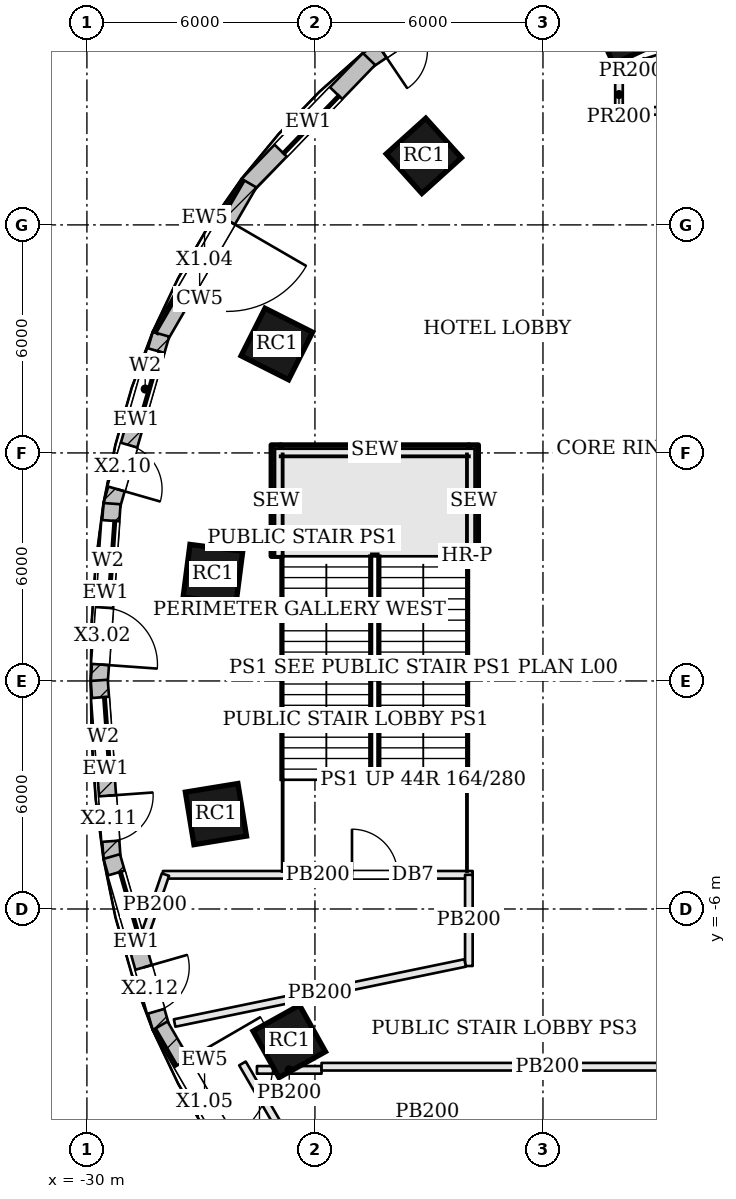
"""IFC4 building model, lengths in metres.
Left out: names, types, materials, properties, quantities, classifications, styles, units other than length and angle.
Written with IfcOpenShell. Run it as: python <this file> out.ifc"""

import sys

from ifc_helpers import new_model, si_unit, direction, frame, frame_2d, origin, origin_2d, place, context, subcontext, project, spatial, rectangle, extrude, element, fill, save


model = new_model("IFC4")
c1 = context("Model", 3, precision=1e-05, world=origin(), true_north=direction((0.0, 1.0)))
c2 = subcontext(c1, "Body", "Model", "MODEL_VIEW")
j1 = project(units=[si_unit("LENGTHUNIT", "METRE"), si_unit("PLANEANGLEUNIT", "RADIAN")], contexts=[c1])
p1 = place(None, origin())
s1 = spatial("IfcSite", under=j1, at=p1, CompositionType="ELEMENT")
p2 = place(p1, origin())
s2 = spatial("IfcBuilding", under=s1, at=p2, CompositionType="ELEMENT")
p3 = place(p2, origin())
s3 = spatial("IfcBuildingStorey", under=s2, at=p3, CompositionType="ELEMENT", Elevation=0.0)
for number, where, z_axis, x_axis in (
    (1, (-15.799, 17.165, 0.0), (0.0, 0.0, 1.0), (-0.908, -0.419, 0.0)),
    (2, (-21.135, 13.817, 0.0), (0.0, 0.0, 1.0), (-0.743, -0.67, 0.0)),
    (3, (-25.003, 8.866, 0.0), (0.0, 0.0, 1.0), (-0.45, -0.893, 0.0)),
    (4, (-26.684, 2.808, 0.0), (0.0, 0.0, 1.0), (-0.128, -0.992, 0.0)),
    (5, (-26.605, -3.503, 0.0), (0.0, 0.0, 1.0), (0.161, -0.987, 0.0)),
    (6, (-24.676, -9.483, 0.0), (0.0, 0.0, 1.0), (0.487, -0.873, 0.0)),
):
    element("IfcColumn", number, at=place(p3, frame(where, z_axis=z_axis, x_axis=x_axis)), inside=s3, PredefinedType="COLUMN", context=c2, shape_type="SweptSolid", body=[
        extrude(rectangle(XDim=1.4, YDim=1.4, at=origin_2d()), origin(), (0.0, 0.0, 1.0), 7.2),
    ])
p4 = place(p3, frame((-18.9, 18.84, 0.0), z_axis=(0.0, 0.0, 1.0), x_axis=(-0.828976924359, -0.559282807604, 0.0)))
e7 = element("IfcWall", 7, at=p4, inside=s3, PredefinedType="SOLIDWALL", context=c2, shape_type="SweptSolid", body=[
    extrude(rectangle(XDim=4.479, YDim=0.45, at=frame_2d((2.24, 0.0))), origin(), (0.0, 0.0, 1.0), 6.95),
])
p5 = place(p4, frame((0.45, 0.0, 0.9)))
e8 = element("IfcOpeningElement", 8, at=p5, cuts=e7, PredefinedType="OPENING", context=c2, shape_type="SweptSolid", body=[
    extrude(rectangle(XDim=2.1, YDim=5.0, at=frame_2d((1.05, 2.5))), frame((0.0, 0.235, 0.0), z_axis=(0.0, -1.0, 0.0), x_axis=(1.0, 0.0, 0.0)), (0.0, 0.0, 1.0), 0.47),
])
p6 = place(p4, frame((2.829, 0.0, 0.0)))
e9 = element("IfcOpeningElement", 9, at=p6, cuts=e7, PredefinedType="OPENING", context=c2, shape_type="SweptSolid", body=[
    extrude(rectangle(XDim=1.2, YDim=2.4, at=frame_2d((0.6, 1.2))), frame((0.0, 0.235, 0.0), z_axis=(0.0, -1.0, 0.0), x_axis=(1.0, 0.0, 0.0)), (0.0, 0.0, 1.0), 0.47),
])
p7 = place(p3, frame((-22.577, 16.365, 0.0), z_axis=(0.0, 0.0, 1.0), x_axis=(-0.694191591241, -0.719790271294, 0.0)))
e10 = element("IfcWall", 10, at=p7, inside=s3, PredefinedType="SOLIDWALL", context=c2, shape_type="SweptSolid", body=[
    extrude(rectangle(XDim=4.597, YDim=0.45, at=frame_2d((2.298, 0.0))), origin(), (0.0, 0.0, 1.0), 6.95),
])
p8 = place(p7, frame((1.249, 0.0, 0.9)))
e11 = element("IfcOpeningElement", 11, at=p8, cuts=e10, PredefinedType="OPENING", context=c2, shape_type="SweptSolid", body=[
    extrude(rectangle(XDim=2.1, YDim=5.0, at=frame_2d((1.05, 2.5))), frame((0.0, 0.235, 0.0), z_axis=(0.0, -1.0, 0.0), x_axis=(1.0, 0.0, 0.0)), (0.0, 0.0, 1.0), 0.47),
])
p9 = place(p3, frame((-25.735, 13.099, 0.0), z_axis=(0.0, 0.0, 1.0), x_axis=(-0.502106426501, -0.864805837438, 0.0)))
e12 = element("IfcWall", 12, at=p9, inside=s3, PredefinedType="SOLIDWALL", context=c2, shape_type="SweptSolid", body=[
    extrude(rectangle(XDim=4.657, YDim=0.45, at=frame_2d((2.328, 0.0))), origin(), (0.0, 0.0, 1.0), 3.55),
])
p10 = place(p9, frame((1.128, 0.0, 0.0)))
e13 = element("IfcOpeningElement", 13, at=p10, cuts=e12, PredefinedType="OPENING", context=c2, shape_type="SweptSolid", body=[
    extrude(rectangle(XDim=2.4, YDim=3.2, at=frame_2d((1.2, 1.6))), frame((0.0, 0.235, 0.0), z_axis=(0.0, -1.0, 0.0), x_axis=(1.0, 0.0, 0.0)), (0.0, 0.0, 1.0), 0.47),
])
p11 = place(p3, frame((-28.052, 9.123, 0.0), z_axis=(0.0, 0.0, 1.0), x_axis=(-0.27637239746, -0.961050621935, 0.0)))
e14 = element("IfcWall", 14, at=p11, inside=s3, PredefinedType="SOLIDWALL", context=c2, shape_type="SweptSolid", body=[
    extrude(rectangle(XDim=4.685, YDim=0.45, at=frame_2d((2.343, 0.0))), origin(), (0.0, 0.0, 1.0), 6.95),
])
p12 = place(p11, frame((0.45, 0.0, 0.9)))
e15 = element("IfcOpeningElement", 15, at=p12, cuts=e14, PredefinedType="OPENING", context=c2, shape_type="SweptSolid", body=[
    extrude(rectangle(XDim=2.1, YDim=5.0, at=frame_2d((1.05, 2.5))), frame((0.0, 0.235, 0.0), z_axis=(0.0, -1.0, 0.0), x_axis=(1.0, 0.0, 0.0)), (0.0, 0.0, 1.0), 0.47),
])
p13 = place(p11, frame((3.035, 0.0, 0.0)))
e16 = element("IfcOpeningElement", 16, at=p13, cuts=e14, PredefinedType="OPENING", context=c2, shape_type="SweptSolid", body=[
    extrude(rectangle(XDim=1.2, YDim=2.4, at=frame_2d((0.6, 1.2))), frame((0.0, 0.235, 0.0), z_axis=(0.0, -1.0, 0.0), x_axis=(1.0, 0.0, 0.0)), (0.0, 0.0, 1.0), 0.47),
])
p14 = place(p3, frame((-29.339, 4.666, 0.0), z_axis=(0.0, 0.0, 1.0), x_axis=(-0.071775601577, -0.997420805387, 0.0)))
e17 = element("IfcWall", 17, at=p14, inside=s3, PredefinedType="SOLIDWALL", context=c2, shape_type="SweptSolid", body=[
    extrude(rectangle(XDim=4.694, YDim=0.45, at=frame_2d((2.347, 0.0))), origin(), (0.0, 0.0, 1.0), 6.95),
])
p15 = place(p14, frame((0.45, 0.0, 0.9)))
e18 = element("IfcOpeningElement", 18, at=p15, cuts=e17, PredefinedType="OPENING", context=c2, shape_type="SweptSolid", body=[
    extrude(rectangle(XDim=2.1, YDim=5.0, at=frame_2d((1.05, 2.5))), frame((0.0, 0.235, 0.0), z_axis=(0.0, -1.0, 0.0), x_axis=(1.0, 0.0, 0.0)), (0.0, 0.0, 1.0), 0.47),
])
p16 = place(p14, frame((2.744, 0.0, 0.0)))
e19 = element("IfcOpeningElement", 19, at=p16, cuts=e17, PredefinedType="OPENING", context=c2, shape_type="SweptSolid", body=[
    extrude(rectangle(XDim=1.5, YDim=2.4, at=frame_2d((0.75, 1.2))), frame((0.0, 0.235, 0.0), z_axis=(0.0, -1.0, 0.0), x_axis=(1.0, 0.0, 0.0)), (0.0, 0.0, 1.0), 0.47),
])
p17 = place(p3, frame((-29.676, 0.016, 0.0), z_axis=(0.0, 0.0, 1.0), x_axis=(0.071775601577, -0.997420805387, 0.0)))
e20 = element("IfcWall", 20, at=p17, inside=s3, PredefinedType="SOLIDWALL", context=c2, shape_type="SweptSolid", body=[
    extrude(rectangle(XDim=4.694, YDim=0.45, at=frame_2d((2.347, 0.0))), origin(), (0.0, 0.0, 1.0), 6.95),
])
p18 = place(p17, frame((0.45, 0.0, 0.9)))
e21 = element("IfcOpeningElement", 21, at=p18, cuts=e20, PredefinedType="OPENING", context=c2, shape_type="SweptSolid", body=[
    extrude(rectangle(XDim=2.1, YDim=5.0, at=frame_2d((1.05, 2.5))), frame((0.0, 0.235, 0.0), z_axis=(0.0, -1.0, 0.0), x_axis=(1.0, 0.0, 0.0)), (0.0, 0.0, 1.0), 0.47),
])
p19 = place(p17, frame((3.044, 0.0, 0.0)))
e22 = element("IfcOpeningElement", 22, at=p19, cuts=e20, PredefinedType="OPENING", context=c2, shape_type="SweptSolid", body=[
    extrude(rectangle(XDim=1.2, YDim=2.4, at=frame_2d((0.6, 1.2))), frame((0.0, 0.235, 0.0), z_axis=(0.0, -1.0, 0.0), x_axis=(1.0, 0.0, 0.0)), (0.0, 0.0, 1.0), 0.47),
])
p20 = place(p3, frame((-29.347, -4.62, 0.0), z_axis=(0.0, 0.0, 1.0), x_axis=(0.27637239746, -0.961050621935, 0.0)))
e23 = element("IfcWall", 23, at=p20, inside=s3, PredefinedType="SOLIDWALL", context=c2, shape_type="SweptSolid", body=[
    extrude(rectangle(XDim=4.685, YDim=0.45, at=frame_2d((2.343, 0.0))), origin(), (0.0, 0.0, 1.0), 6.95),
])
p21 = place(p20, frame((0.45, 0.0, 0.9)))
e24 = element("IfcOpeningElement", 24, at=p21, cuts=e23, PredefinedType="OPENING", context=c2, shape_type="SweptSolid", body=[
    extrude(rectangle(XDim=2.1, YDim=5.0, at=frame_2d((1.05, 2.5))), frame((0.0, 0.235, 0.0), z_axis=(0.0, -1.0, 0.0), x_axis=(1.0, 0.0, 0.0)), (0.0, 0.0, 1.0), 0.47),
])
p22 = place(p20, frame((3.035, 0.0, 0.0)))
e25 = element("IfcOpeningElement", 25, at=p22, cuts=e23, PredefinedType="OPENING", context=c2, shape_type="SweptSolid", body=[
    extrude(rectangle(XDim=1.2, YDim=2.4, at=frame_2d((0.6, 1.2))), frame((0.0, 0.235, 0.0), z_axis=(0.0, -1.0, 0.0), x_axis=(1.0, 0.0, 0.0)), (0.0, 0.0, 1.0), 0.47),
])
p23 = place(p3, frame((-28.073, -9.072, 0.0), z_axis=(0.0, 0.0, 1.0), x_axis=(0.502106426501, -0.864805837438, 0.0)))
e26 = element("IfcWall", 26, at=p23, inside=s3, PredefinedType="SOLIDWALL", context=c2, shape_type="SweptSolid", body=[
    extrude(rectangle(XDim=4.657, YDim=0.45, at=frame_2d((2.328, 0.0))), origin(), (0.0, 0.0, 1.0), 3.55),
])
p24 = place(p23, frame((1.128, 0.0, 0.0)))
e27 = element("IfcOpeningElement", 27, at=p24, cuts=e26, PredefinedType="OPENING", context=c2, shape_type="SweptSolid", body=[
    extrude(rectangle(XDim=2.4, YDim=3.2, at=frame_2d((1.2, 1.6))), frame((0.0, 0.235, 0.0), z_axis=(0.0, -1.0, 0.0), x_axis=(1.0, 0.0, 0.0)), (0.0, 0.0, 1.0), 0.47),
])
p25 = place(p3, frame((-28.0, -5.1, 0.0), z_axis=(0.0, 0.0, 1.0), x_axis=(1.0, 0.0, 0.0)))
e28 = element("IfcWall", 28, at=p25, inside=s3, PredefinedType="PARTITIONING", context=c2, shape_type="SweptSolid", body=[
    extrude(rectangle(XDim=8.15, YDim=0.2, at=frame_2d((4.075, 0.0))), origin(), (0.0, 0.0, 1.0), 6.23),
])
p26 = place(p25, frame((4.975, 0.0, 0.0)))
e29 = element("IfcOpeningElement", 29, at=p26, cuts=e28, PredefinedType="OPENING", context=c2, shape_type="SweptSolid", body=[
    extrude(rectangle(XDim=1.2, YDim=2.1, at=frame_2d((0.6, 1.05))), frame((0.0, 0.11, 0.0), z_axis=(0.0, -1.0, 0.0), x_axis=(1.0, 0.0, 0.0)), (0.0, 0.0, 1.0), 0.22),
])
p27 = place(p3, frame((-19.95, -5.1, 0.0), z_axis=(0.0, 0.0, 1.0), x_axis=(0.0, -1.0, 0.0)))
e30 = element("IfcWall", 30, at=p27, inside=s3, PredefinedType="PARTITIONING", context=c2, shape_type="SweptSolid", body=[
    extrude(rectangle(XDim=2.4, YDim=0.2, at=frame_2d((1.2, 0.0))), origin(), (0.0, 0.0, 1.0), 6.23),
])
p28 = place(p3, frame((-20.048, -7.42, 0.0), z_axis=(0.0, 0.0, 1.0), x_axis=(-0.979295927035, -0.202433908454, 0.0)))
e31 = element("IfcWall", 31, at=p28, inside=s3, PredefinedType="PARTITIONING", context=c2, shape_type="SweptSolid", body=[
    extrude(rectangle(XDim=7.805, YDim=0.2, at=frame_2d((3.903, 0.0))), origin(), (0.0, 0.0, 1.0), 6.23),
])
p29 = place(p3, frame((-28.486, -6.705, 0.0), z_axis=(0.0, 0.0, 1.0), x_axis=(0.324819241982, 0.945776115176, 0.0)))
e32 = element("IfcWall", 32, at=p29, inside=s3, PredefinedType="PARTITIONING", context=c2, shape_type="SweptSolid", body=[
    extrude(rectangle(XDim=1.702, YDim=0.2, at=frame_2d((0.851, 0.0))), origin(), (0.0, 0.0, 1.0), 6.23),
])
p30 = place(p3, frame((-25.526, -10.233, 0.0), z_axis=(0.0, 0.0, 1.0), x_axis=(1.0, 0.0, 0.0)))
e33 = element("IfcWall", 33, at=p30, inside=s3, PredefinedType="PARTITIONING", context=c2, shape_type="SweptSolid", body=[
    extrude(rectangle(XDim=1.7, YDim=0.2, at=frame_2d((0.85, 0.0))), origin(), (0.0, 0.0, 1.0), 6.23),
])
p31 = place(p3, frame((-23.826, -10.15, 0.0), z_axis=(0.0, 0.0, 1.0), x_axis=(1.0, 0.0, 0.0)))
e34 = element("IfcWall", 34, at=p31, inside=s3, PredefinedType="PARTITIONING", context=c2, shape_type="SweptSolid", body=[
    extrude(rectangle(XDim=11.886, YDim=0.2, at=frame_2d((5.943, 0.0))), origin(), (0.0, 0.0, 1.0), 6.23),
])
p32 = place(p3, frame((-25.885, -12.228, 0.0), z_axis=(0.0, 0.0, 1.0), x_axis=(0.864771360507, 0.502165803343, 0.0)))
e35 = element("IfcWall", 35, at=p32, inside=s3, PredefinedType="PARTITIONING", context=c2, shape_type="SweptSolid", body=[
    extrude(rectangle(XDim=1.167, YDim=0.2, at=frame_2d((0.583, 0.0))), origin(), (0.0, 0.0, 1.0), 6.23),
])
p33 = place(p3, frame((-25.012, -11.606, 0.0), z_axis=(0.0, 0.0, 1.0), x_axis=(-0.501996766252, 0.864869496903, 0.0)))
e36 = element("IfcWall", 36, at=p33, inside=s3, PredefinedType="PARTITIONING", context=c2, shape_type="SweptSolid", body=[
    extrude(rectangle(XDim=1.783, YDim=0.2, at=frame_2d((0.892, 0.0))), origin(), (0.0, 0.0, 1.0), 6.23),
])
p34 = place(p3, frame((-16.085, 15.805, 0.0), z_axis=(0.0, 0.0, 1.0), x_axis=(0.847119078257, 0.531403111822, 0.0)))
e37 = element("IfcWall", 37, at=p34, inside=s3, PredefinedType="PARTITIONING", context=c2, shape_type="SweptSolid", body=[
    extrude(rectangle(XDim=0.937, YDim=0.2, at=frame_2d((0.469, 0.0))), origin(), (0.0, 0.0, 1.0), 6.58),
])
p35 = place(p3, frame((-15.281, 16.28, 0.0), z_axis=(0.0, 0.0, 1.0), x_axis=(0.953923236658, 0.300050759979, 0.0)))
e38 = element("IfcWall", 38, at=p35, inside=s3, PredefinedType="PARTITIONING", context=c2, shape_type="SweptSolid", body=[
    extrude(rectangle(XDim=6.089, YDim=0.2, at=frame_2d((3.044, 0.0))), origin(), (0.0, 0.0, 1.0), 6.58),
])
p36 = place(p3, frame((-7.147, 15.0, 0.0), z_axis=(0.0, 0.0, 1.0), x_axis=(-1.0, 0.0, 0.0)))
e39 = element("IfcWall", 39, at=p36, inside=s3, PredefinedType="PARTITIONING", context=c2, shape_type="SweptSolid", body=[
    extrude(rectangle(XDim=8.953, YDim=0.2, at=frame_2d((4.477, 0.0))), origin(), (0.0, 0.0, 1.0), 6.23),
])
p37 = place(p36, frame((3.876, 0.0, 0.0)))
e40 = element("IfcOpeningElement", 40, at=p37, cuts=e39, PredefinedType="OPENING", context=c2, shape_type="SweptSolid", body=[
    extrude(rectangle(XDim=1.0, YDim=2.1, at=frame_2d((0.5, 1.05))), frame((0.0, 0.11, 0.0), z_axis=(0.0, -1.0, 0.0), x_axis=(1.0, 0.0, 0.0)), (0.0, 0.0, 1.0), 0.22),
])
p38 = place(p3, frame((-16.0, 15.1, 0.0), z_axis=(0.0, 0.0, 1.0), x_axis=(0.0, 1.0, 0.0)))
e41 = element("IfcWall", 41, at=p38, inside=s3, PredefinedType="PARTITIONING", context=c2, shape_type="SweptSolid", body=[
    extrude(rectangle(XDim=0.658, YDim=0.2, at=frame_2d((0.329, 0.0))), origin(), (0.0, 0.0, 1.0), 6.58),
])
p39 = place(p3, frame((-19.95, 6.085, 0.0), z_axis=(0.0, 0.0, 1.0), x_axis=(-1.0, 0.0, 0.0)))
e42 = element("IfcWall", 42, at=p39, inside=s3, PredefinedType="SOLIDWALL", context=c2, shape_type="SweptSolid", body=[
    extrude(rectangle(XDim=4.95, YDim=0.25, at=frame_2d((2.475, 0.0))), origin(), (0.0, 0.0, 1.0), 6.95),
])
for number, where, z_axis, x_axis in (
    (43, (-25.025, 3.28, 0.0), (0.0, 0.0, 1.0), (0.0, 1.0, 0.0)),
    (44, (-19.825, 3.28, 0.0), (0.0, 0.0, 1.0), (0.0, 1.0, 0.0)),
):
    element("IfcWall", number, at=place(p3, frame(where, z_axis=z_axis, x_axis=x_axis)), inside=s3, PredefinedType="SOLIDWALL", context=c2, shape_type="SweptSolid", body=[
        extrude(rectangle(XDim=2.93, YDim=0.25, at=frame_2d((1.465, 0.0))), origin(), (0.0, 0.0, 1.0), 6.95),
    ])
p40 = place(p8, origin())
e45 = element("IfcWindow", 45, at=p40, inside=s3, PartitioningType="SINGLE_PANEL", PredefinedType="WINDOW", context=c2, shape_type="SweptSolid", body=[
    extrude(rectangle(XDim=2.1, YDim=5.0, at=frame_2d((1.05, 2.5))), frame((0.0, 0.135, 0.0), z_axis=(0.0, -1.0, 0.0), x_axis=(1.0, 0.0, 0.0)), (0.0, 0.0, 1.0), 0.06),
])
fill(e11, e45)
p41 = place(p10, origin())
e46 = element("IfcDoor", 46, at=p41, inside=s3, OperationType="DOUBLE_DOOR_DOUBLE_SWING", PredefinedType="DOOR", context=c2, shape_type="SweptSolid", body=[
    extrude(rectangle(XDim=2.4, YDim=3.2, at=frame_2d((1.2, 1.6))), frame((0.0, 0.025, 0.0), z_axis=(0.0, -1.0, 0.0), x_axis=(1.0, 0.0, 0.0)), (0.0, 0.0, 1.0), 0.05),
])
fill(e13, e46)
p42 = place(p12, origin())
e47 = element("IfcWindow", 47, at=p42, inside=s3, PartitioningType="SINGLE_PANEL", PredefinedType="WINDOW", context=c2, shape_type="SweptSolid", body=[
    extrude(rectangle(XDim=2.1, YDim=5.0, at=frame_2d((1.05, 2.5))), frame((0.0, 0.135, 0.0), z_axis=(0.0, -1.0, 0.0), x_axis=(1.0, 0.0, 0.0)), (0.0, 0.0, 1.0), 0.06),
])
fill(e15, e47)
p43 = place(p13, frame((1.2, 0.0, 0.0), z_axis=(0.0, 0.0, 1.0), x_axis=(-1.0, 0.0, 0.0)))
e48 = element("IfcDoor", 48, at=p43, inside=s3, OperationType="SINGLE_SWING_RIGHT", PredefinedType="DOOR", context=c2, shape_type="SweptSolid", body=[
    extrude(rectangle(XDim=1.2, YDim=2.4, at=frame_2d((0.6, 1.2))), frame((0.0, 0.025, 0.0), z_axis=(0.0, -1.0, 0.0), x_axis=(1.0, 0.0, 0.0)), (0.0, 0.0, 1.0), 0.05),
])
fill(e16, e48)
p44 = place(p15, origin())
e49 = element("IfcWindow", 49, at=p44, inside=s3, PartitioningType="SINGLE_PANEL", PredefinedType="WINDOW", context=c2, shape_type="SweptSolid", body=[
    extrude(rectangle(XDim=2.1, YDim=5.0, at=frame_2d((1.05, 2.5))), frame((0.0, 0.135, 0.0), z_axis=(0.0, -1.0, 0.0), x_axis=(1.0, 0.0, 0.0)), (0.0, 0.0, 1.0), 0.06),
])
fill(e18, e49)
p45 = place(p16, frame((1.5, 0.0, 0.0), z_axis=(0.0, 0.0, 1.0), x_axis=(-1.0, 0.0, 0.0)))
e50 = element("IfcDoor", 50, at=p45, inside=s3, OperationType="SINGLE_SWING_RIGHT", PredefinedType="DOOR", context=c2, shape_type="SweptSolid", body=[
    extrude(rectangle(XDim=1.5, YDim=2.4, at=frame_2d((0.75, 1.2))), frame((0.0, 0.025, 0.0), z_axis=(0.0, -1.0, 0.0), x_axis=(1.0, 0.0, 0.0)), (0.0, 0.0, 1.0), 0.05),
])
fill(e19, e50)
p46 = place(p18, origin())
e51 = element("IfcWindow", 51, at=p46, inside=s3, PartitioningType="SINGLE_PANEL", PredefinedType="WINDOW", context=c2, shape_type="SweptSolid", body=[
    extrude(rectangle(XDim=2.1, YDim=5.0, at=frame_2d((1.05, 2.5))), frame((0.0, 0.135, 0.0), z_axis=(0.0, -1.0, 0.0), x_axis=(1.0, 0.0, 0.0)), (0.0, 0.0, 1.0), 0.06),
])
fill(e21, e51)
p47 = place(p19, frame((1.2, 0.0, 0.0), z_axis=(0.0, 0.0, 1.0), x_axis=(-1.0, 0.0, 0.0)))
e52 = element("IfcDoor", 52, at=p47, inside=s3, OperationType="SINGLE_SWING_LEFT", PredefinedType="DOOR", context=c2, shape_type="SweptSolid", body=[
    extrude(rectangle(XDim=1.2, YDim=2.4, at=frame_2d((0.6, 1.2))), frame((0.0, 0.025, 0.0), z_axis=(0.0, -1.0, 0.0), x_axis=(1.0, 0.0, 0.0)), (0.0, 0.0, 1.0), 0.05),
])
fill(e22, e52)
p48 = place(p21, origin())
e53 = element("IfcWindow", 53, at=p48, inside=s3, PartitioningType="SINGLE_PANEL", PredefinedType="WINDOW", context=c2, shape_type="SweptSolid", body=[
    extrude(rectangle(XDim=2.1, YDim=5.0, at=frame_2d((1.05, 2.5))), frame((0.0, 0.135, 0.0), z_axis=(0.0, -1.0, 0.0), x_axis=(1.0, 0.0, 0.0)), (0.0, 0.0, 1.0), 0.06),
])
fill(e24, e53)
p49 = place(p22, frame((1.2, 0.0, 0.0), z_axis=(0.0, 0.0, 1.0), x_axis=(-1.0, 0.0, 0.0)))
e54 = element("IfcDoor", 54, at=p49, inside=s3, OperationType="SINGLE_SWING_LEFT", PredefinedType="DOOR", context=c2, shape_type="SweptSolid", body=[
    extrude(rectangle(XDim=1.2, YDim=2.4, at=frame_2d((0.6, 1.2))), frame((0.0, 0.025, 0.0), z_axis=(0.0, -1.0, 0.0), x_axis=(1.0, 0.0, 0.0)), (0.0, 0.0, 1.0), 0.05),
])
fill(e25, e54)
p50 = place(p24, origin())
e55 = element("IfcDoor", 55, at=p50, inside=s3, OperationType="DOUBLE_DOOR_DOUBLE_SWING", PredefinedType="DOOR", context=c2, shape_type="SweptSolid", body=[
    extrude(rectangle(XDim=2.4, YDim=3.2, at=frame_2d((1.2, 1.6))), frame((0.0, 0.025, 0.0), z_axis=(0.0, -1.0, 0.0), x_axis=(1.0, 0.0, 0.0)), (0.0, 0.0, 1.0), 0.05),
])
fill(e27, e55)
p51 = place(p26, origin())
e56 = element("IfcDoor", 56, at=p51, inside=s3, OperationType="SINGLE_SWING_LEFT", PredefinedType="DOOR", context=c2, shape_type="SweptSolid", body=[
    extrude(rectangle(XDim=1.2, YDim=2.1, at=frame_2d((0.6, 1.05))), frame((0.0, 0.025, 0.0), z_axis=(0.0, -1.0, 0.0), x_axis=(1.0, 0.0, 0.0)), (0.0, 0.0, 1.0), 0.05),
])
fill(e29, e56)
save(model, sys.argv[1])
